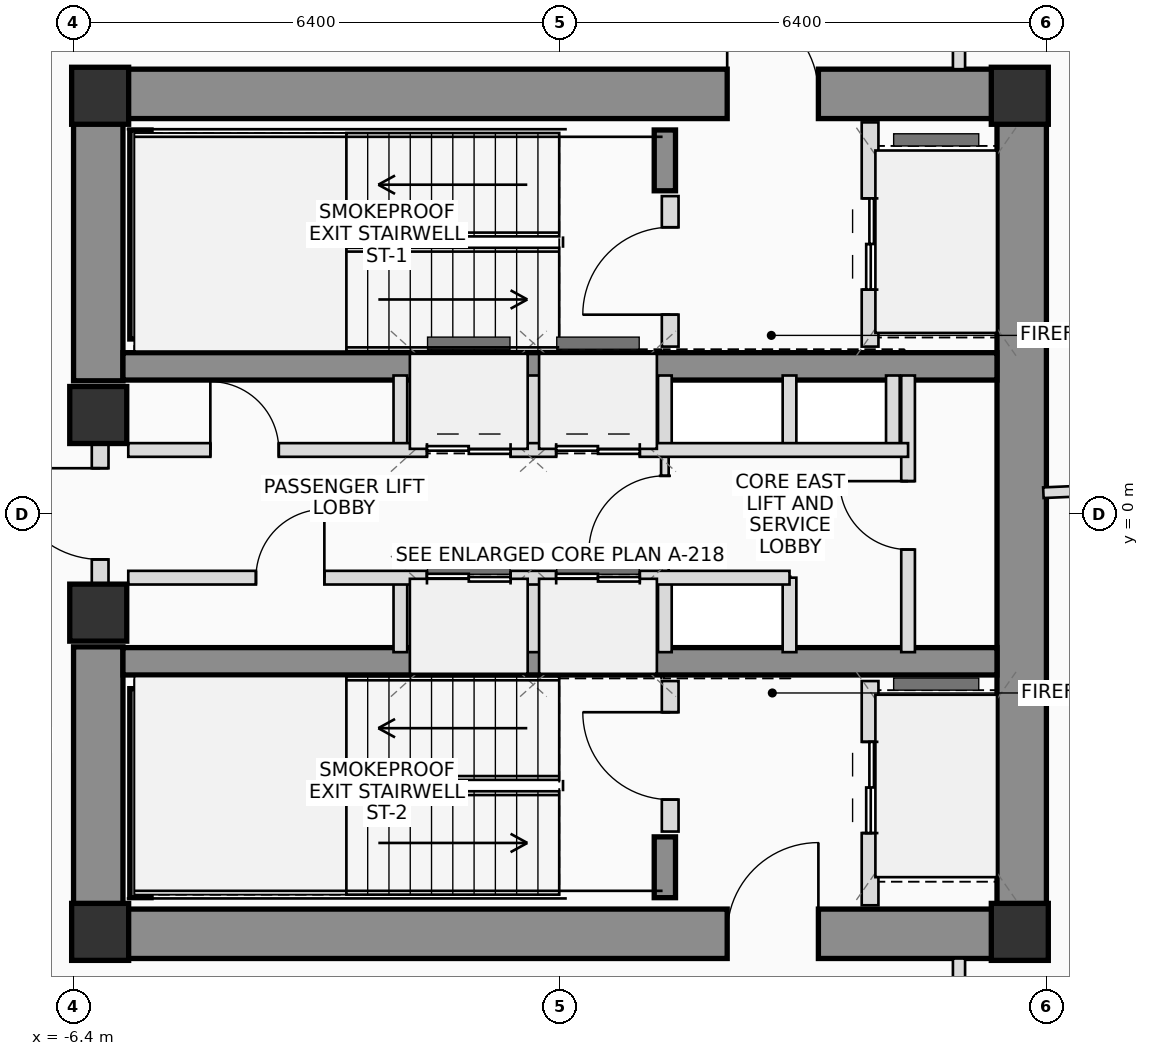
"""IFC4 building model, lengths in metres.
Left out: names, types, materials, properties, quantities, classifications, styles, units other than length and angle.
Written with IfcOpenShell. Run it as: python <this file> out.ifc"""

import sys

from ifc_helpers import new_model, si_unit, direction, frame, frame_2d, origin, origin_2d, place, context, subcontext, project, spatial, rectangle, extrude, source, transform, mapped, element, fill, save


model = new_model("IFC4")
c1 = context("Model", 3, precision=1e-05, world=origin(), true_north=direction((0.0, 1.0)))
c2 = subcontext(c1, "Body", "Model", "MODEL_VIEW")
j1 = project(units=[si_unit("LENGTHUNIT", "METRE"), si_unit("PLANEANGLEUNIT", "RADIAN")], contexts=[c1])
p1 = place(None, origin())
s1 = spatial("IfcSite", under=j1, at=p1, CompositionType="ELEMENT")
p2 = place(p1, origin())
s2 = spatial("IfcBuilding", under=s1, at=p2, CompositionType="ELEMENT")
p3 = place(p2, frame((0.0, 0.0, 201.8)))
s3 = spatial("IfcBuildingStorey", under=s2, at=p3, CompositionType="ELEMENT", Elevation=201.8)
m1 = source(origin(), c2, "Body", "SweptSolid", [
    extrude(rectangle(XDim=0.75, YDim=0.75, at=origin_2d()), origin(), (0.0, 0.0, 1.0), 3.45),
])
for number, where, z_axis, x_axis in (
    (1, (-6.05, -5.5, 0.0), (0.0, 0.0, 1.0), (1.0, 0.0, 0.0)),
    (2, (6.05, -5.5, 0.0), (0.0, 0.0, 1.0), (1.0, 0.0, 0.0)),
    (3, (6.05, 5.5, 0.0), (0.0, 0.0, 1.0), (1.0, 0.0, 0.0)),
    (4, (-6.05, 5.5, 0.0), (0.0, 0.0, 1.0), (1.0, 0.0, 0.0)),
):
    element("IfcColumn", number, at=place(p3, frame(where, z_axis=z_axis, x_axis=x_axis)), inside=s3, PredefinedType="COLUMN", context=c2, shape_type="MappedRepresentation", body=[
        mapped(m1, transform((0.0, 0.0, 0.0), scale=1.0)),
    ])
p4 = place(p3, frame((-6.4, 5.525, 0.0), z_axis=(0.0, 0.0, 1.0), x_axis=(1.0, 0.0, 0.0)))
e5 = element("IfcWall", 5, at=p4, inside=s3, PredefinedType="SHEAR", context=c2, shape_type="SweptSolid", body=[
    extrude(rectangle(XDim=12.8, YDim=0.65, at=frame_2d((6.4, 0.0))), origin(), (0.0, 0.0, 1.0), 3.45),
])
p5 = place(p4, frame((8.6, 0.0, 0.0)))
e6 = element("IfcOpeningElement", 6, at=p5, cuts=e5, PredefinedType="OPENING", context=c2, shape_type="SweptSolid", body=[
    extrude(rectangle(XDim=1.2, YDim=2.2, at=frame_2d((0.6, 1.1))), frame((0.0, 0.335, 0.0), z_axis=(0.0, -1.0, 0.0), x_axis=(1.0, 0.0, 0.0)), (0.0, 0.0, 1.0), 0.67),
])
p6 = place(p3, frame((-6.4, -5.525, 0.0), z_axis=(0.0, 0.0, 1.0), x_axis=(1.0, 0.0, 0.0)))
e7 = element("IfcWall", 7, at=p6, inside=s3, PredefinedType="SHEAR", context=c2, shape_type="SweptSolid", body=[
    extrude(rectangle(XDim=12.8, YDim=0.65, at=frame_2d((6.4, 0.0))), origin(), (0.0, 0.0, 1.0), 3.45),
])
p7 = place(p6, frame((8.6, 0.0, 0.0)))
e8 = element("IfcOpeningElement", 8, at=p7, cuts=e7, PredefinedType="OPENING", context=c2, shape_type="SweptSolid", body=[
    extrude(rectangle(XDim=1.2, YDim=2.2, at=frame_2d((0.6, 1.1))), frame((0.0, 0.335, 0.0), z_axis=(0.0, -1.0, 0.0), x_axis=(1.0, 0.0, 0.0)), (0.0, 0.0, 1.0), 0.67),
])
p8 = place(p3, frame((6.075, -5.2, 0.0), z_axis=(0.0, 0.0, 1.0), x_axis=(0.0, 1.0, 0.0)))
e9 = element("IfcWall", 9, at=p8, inside=s3, PredefinedType="SHEAR", context=c2, shape_type="SweptSolid", body=[
    extrude(rectangle(XDim=10.4, YDim=0.65, at=frame_2d((5.2, 0.0))), origin(), (0.0, 0.0, 1.0), 3.45),
])
for number, where, z_axis, x_axis in (
    (10, (-6.075, -5.2, 0.0), (0.0, 0.0, 1.0), (0.0, 1.0, 0.0)),
    (11, (-6.075, 1.75, 0.0), (0.0, 0.0, 1.0), (0.0, 1.0, 0.0)),
):
    element("IfcWall", number, at=place(p3, frame(where, z_axis=z_axis, x_axis=x_axis)), inside=s3, PredefinedType="SHEAR", context=c2, shape_type="SweptSolid", body=[
        extrude(rectangle(XDim=3.45, YDim=0.65, at=frame_2d((1.725, 0.0))), origin(), (0.0, 0.0, 1.0), 3.45),
    ])
for number, where, z_axis, x_axis in (
    (12, (-5.75, 1.94, 0.0), (0.0, 0.0, 1.0), (1.0, 0.0, 0.0)),
    (13, (-5.75, -1.94, 0.0), (0.0, 0.0, 1.0), (1.0, 0.0, 0.0)),
):
    element("IfcWall", number, at=place(p3, frame(where, z_axis=z_axis, x_axis=x_axis)), inside=s3, PredefinedType="SHEAR", context=c2, shape_type="SweptSolid", body=[
        extrude(rectangle(XDim=11.5, YDim=0.36, at=frame_2d((5.75, 0.0))), origin(), (0.0, 0.0, 1.0), 3.45),
    ])
p9 = place(p3, frame((-5.52, 2.3, 0.0), z_axis=(0.0, 0.0, 1.0), x_axis=(0.0, 1.0, 0.0)))
e14 = element("IfcWall", 14, at=p9, inside=s3, PredefinedType="SHEAR", context=c2, shape_type="SweptSolid", body=[
    extrude(rectangle(XDim=2.75, YDim=0.28, at=frame_2d((1.375, 0.0))), origin(), (0.0, 0.0, 1.0), 3.45),
])
p10 = place(p3, frame((1.38, 4.25, 0.0), z_axis=(0.0, 0.0, 1.0), x_axis=(0.0, 1.0, 0.0)))
e15 = element("IfcWall", 15, at=p10, inside=s3, PredefinedType="SHEAR", context=c2, shape_type="SweptSolid", body=[
    extrude(rectangle(XDim=0.8, YDim=0.28, at=frame_2d((0.4, 0.0))), origin(), (0.0, 0.0, 1.0), 3.45),
])
p11 = place(p3, frame((-5.52, -5.05, 0.0), z_axis=(0.0, 0.0, 1.0), x_axis=(0.0, 1.0, 0.0)))
e16 = element("IfcWall", 16, at=p11, inside=s3, PredefinedType="SHEAR", context=c2, shape_type="SweptSolid", body=[
    extrude(rectangle(XDim=2.75, YDim=0.28, at=frame_2d((1.375, 0.0))), origin(), (0.0, 0.0, 1.0), 3.45),
])
p12 = place(p3, frame((1.38, -5.05, 0.0), z_axis=(0.0, 0.0, 1.0), x_axis=(0.0, 1.0, 0.0)))
e17 = element("IfcWall", 17, at=p12, inside=s3, PredefinedType="SHEAR", context=c2, shape_type="SweptSolid", body=[
    extrude(rectangle(XDim=0.8, YDim=0.28, at=frame_2d((0.4, 0.0))), origin(), (0.0, 0.0, 1.0), 3.45),
])
for number, where, z_axis, x_axis in (
    (18, (-6.075, -1.3, 0.0), (0.0, 0.0, 1.0), (1.0, 0.0, 0.0)),
    (19, (-6.075, 1.3, 0.0), (0.0, 0.0, 1.0), (1.0, 0.0, 0.0)),
):
    element("IfcColumn", number, at=place(p3, frame(where, z_axis=z_axis, x_axis=x_axis)), inside=s3, PredefinedType="COLUMN", context=c2, shape_type="MappedRepresentation", body=[
        mapped(m1, transform((0.0, 0.0, 0.0), scale=1.0)),
    ])
p13 = place(p3, frame((-6.05, -0.95, 0.0), z_axis=(0.0, 0.0, 1.0), x_axis=(0.0, 1.0, 0.0)))
e20 = element("IfcWall", 20, at=p13, inside=s3, PredefinedType="PLUMBINGWALL", context=c2, shape_type="SweptSolid", body=[
    extrude(rectangle(XDim=1.9, YDim=0.22, at=frame_2d((0.95, 0.0))), origin(), (0.0, 0.0, 1.0), 2.23),
])
p14 = place(p13, frame((0.35, 0.0, 0.0)))
e21 = element("IfcOpeningElement", 21, at=p14, cuts=e20, PredefinedType="OPENING", context=c2, shape_type="SweptSolid", body=[
    extrude(rectangle(XDim=1.2, YDim=2.2, at=frame_2d((0.6, 1.1))), frame((0.0, 0.12, 0.0), z_axis=(0.0, -1.0, 0.0), x_axis=(1.0, 0.0, 0.0)), (0.0, 0.0, 1.0), 0.24),
])
p15 = place(p3, frame((1.45, 2.2, 0.0), z_axis=(0.0, 0.0, 1.0), x_axis=(0.0, 1.0, 0.0)))
e22 = element("IfcWall", 22, at=p15, inside=s3, PredefinedType="PLUMBINGWALL", context=c2, shape_type="SweptSolid", body=[
    extrude(rectangle(XDim=1.98, YDim=0.22, at=frame_2d((0.99, 0.0))), origin(), (0.0, 0.0, 1.0), 3.25),
])
p16 = place(p15, frame((0.42, 0.0, 0.0)))
e23 = element("IfcOpeningElement", 23, at=p16, cuts=e22, PredefinedType="OPENING", context=c2, shape_type="SweptSolid", body=[
    extrude(rectangle(XDim=1.15, YDim=2.15, at=frame_2d((0.575, 1.075))), frame((0.0, 0.12, 0.0), z_axis=(0.0, -1.0, 0.0), x_axis=(1.0, 0.0, 0.0)), (0.0, 0.0, 1.0), 0.24),
])
p17 = place(p3, frame((4.08, 2.2, 0.0), z_axis=(0.0, 0.0, 1.0), x_axis=(0.0, 1.0, 0.0)))
e24 = element("IfcWall", 24, at=p17, inside=s3, PredefinedType="PLUMBINGWALL", context=c2, shape_type="SweptSolid", body=[
    extrude(rectangle(XDim=2.95, YDim=0.22, at=frame_2d((1.475, 0.0))), origin(), (0.0, 0.0, 1.0), 3.25),
])
p18 = place(p17, frame((0.75, 0.0, 0.0)))
e25 = element("IfcOpeningElement", 25, at=p18, cuts=e24, PredefinedType="OPENING", context=c2, shape_type="SweptSolid", body=[
    extrude(rectangle(XDim=1.2, YDim=2.25, at=frame_2d((0.6, 1.125))), frame((0.0, 0.12, 0.0), z_axis=(0.0, -1.0, 0.0), x_axis=(1.0, 0.0, 0.0)), (0.0, 0.0, 1.0), 0.24),
])
p19 = place(p3, frame((1.45, -4.18, 0.0), z_axis=(0.0, 0.0, 1.0), x_axis=(0.0, 1.0, 0.0)))
e26 = element("IfcWall", 26, at=p19, inside=s3, PredefinedType="PLUMBINGWALL", context=c2, shape_type="SweptSolid", body=[
    extrude(rectangle(XDim=1.98, YDim=0.22, at=frame_2d((0.99, 0.0))), origin(), (0.0, 0.0, 1.0), 3.25),
])
p20 = place(p19, frame((0.42, 0.0, 0.0)))
e27 = element("IfcOpeningElement", 27, at=p20, cuts=e26, PredefinedType="OPENING", context=c2, shape_type="SweptSolid", body=[
    extrude(rectangle(XDim=1.15, YDim=2.15, at=frame_2d((0.575, 1.075))), frame((0.0, 0.12, 0.0), z_axis=(0.0, -1.0, 0.0), x_axis=(1.0, 0.0, 0.0)), (0.0, 0.0, 1.0), 0.24),
])
p21 = place(p3, frame((4.08, -5.15, 0.0), z_axis=(0.0, 0.0, 1.0), x_axis=(0.0, 1.0, 0.0)))
e28 = element("IfcWall", 28, at=p21, inside=s3, PredefinedType="PLUMBINGWALL", context=c2, shape_type="SweptSolid", body=[
    extrude(rectangle(XDim=2.95, YDim=0.22, at=frame_2d((1.475, 0.0))), origin(), (0.0, 0.0, 1.0), 3.25),
])
p22 = place(p21, frame((0.95, 0.0, 0.0)))
e29 = element("IfcOpeningElement", 29, at=p22, cuts=e28, PredefinedType="OPENING", context=c2, shape_type="SweptSolid", body=[
    extrude(rectangle(XDim=1.2, YDim=2.25, at=frame_2d((0.6, 1.125))), frame((0.0, 0.12, 0.0), z_axis=(0.0, -1.0, 0.0), x_axis=(1.0, 0.0, 0.0)), (0.0, 0.0, 1.0), 0.24),
])
p23 = place(p3, frame((1.38, -0.84, 0.0), z_axis=(0.0, 0.0, 1.0), x_axis=(0.0, 1.0, 0.0)))
e30 = element("IfcWall", 30, at=p23, inside=s3, PredefinedType="PARTITIONING", context=c2, shape_type="SweptSolid", body=[
    extrude(rectangle(XDim=1.68, YDim=0.1, at=frame_2d((0.84, 0.0))), origin(), (0.0, 0.0, 1.0), 3.25),
])
p24 = place(p23, frame((0.34, 0.0, 0.0)))
e31 = element("IfcOpeningElement", 31, at=p24, cuts=e30, PredefinedType="OPENING", context=c2, shape_type="SweptSolid", body=[
    extrude(rectangle(XDim=1.0, YDim=2.25, at=frame_2d((0.5, 1.125))), frame((0.0, 0.06, 0.0), z_axis=(0.0, -1.0, 0.0), x_axis=(1.0, 0.0, 0.0)), (0.0, 0.0, 1.0), 0.12),
])
for number, where, z_axis, x_axis in (
    (32, (-2.1, 0.84, 0.0), (0.0, 0.0, 1.0), (0.0, 1.0, 0.0)),
    (33, (-2.1, -1.82, 0.0), (0.0, 0.0, 1.0), (0.0, 1.0, 0.0)),
    (34, (-0.35, 0.84, 0.0), (0.0, 0.0, 1.0), (0.0, 1.0, 0.0)),
    (35, (-0.35, -1.82, 0.0), (0.0, 0.0, 1.0), (0.0, 1.0, 0.0)),
    (36, (1.38, 0.84, 0.0), (0.0, 0.0, 1.0), (0.0, 1.0, 0.0)),
    (37, (1.38, -1.82, 0.0), (0.0, 0.0, 1.0), (0.0, 1.0, 0.0)),
    (38, (3.02, 0.84, 0.0), (0.0, 0.0, 1.0), (0.0, 1.0, 0.0)),
    (39, (4.38, 0.84, 0.0), (0.0, 0.0, 1.0), (0.0, 1.0, 0.0)),
    (40, (3.02, -1.82, 0.0), (0.0, 0.0, 1.0), (0.0, 1.0, 0.0)),
):
    element("IfcWall", number, at=place(p3, frame(where, z_axis=z_axis, x_axis=x_axis)), inside=s3, PredefinedType="PLUMBINGWALL", context=c2, shape_type="SweptSolid", body=[
        extrude(rectangle(XDim=0.98, YDim=0.18, at=frame_2d((0.49, 0.0))), origin(), (0.0, 0.0, 1.0), 3.25),
    ])
p25 = place(p3, frame((4.58, -1.82, 0.0), z_axis=(0.0, 0.0, 1.0), x_axis=(0.0, 1.0, 0.0)))
e41 = element("IfcWall", 41, at=p25, inside=s3, PredefinedType="PLUMBINGWALL", context=c2, shape_type="SweptSolid", body=[
    extrude(rectangle(XDim=3.64, YDim=0.18, at=frame_2d((1.82, 0.0))), origin(), (0.0, 0.0, 1.0), 3.25),
])
p26 = place(p25, frame((1.35, 0.0, 0.0)))
e42 = element("IfcOpeningElement", 42, at=p26, cuts=e41, PredefinedType="OPENING", context=c2, shape_type="SweptSolid", body=[
    extrude(rectangle(XDim=0.9, YDim=2.05, at=frame_2d((0.45, 1.025))), frame((0.0, 0.1, 0.0), z_axis=(0.0, -1.0, 0.0), x_axis=(1.0, 0.0, 0.0)), (0.0, 0.0, 1.0), 0.2),
])
p27 = place(p3, frame((-5.68, 0.84, 0.0), z_axis=(0.0, 0.0, 1.0), x_axis=(1.0, 0.0, 0.0)))
e43 = element("IfcWall", 43, at=p27, inside=s3, PredefinedType="PLUMBINGWALL", context=c2, shape_type="SweptSolid", body=[
    extrude(rectangle(XDim=10.26, YDim=0.18, at=frame_2d((5.13, 0.0))), origin(), (0.0, 0.0, 1.0), 3.25),
])
p28 = place(p27, frame((1.08, 0.0, 0.0)))
e44 = element("IfcOpeningElement", 44, at=p28, cuts=e43, PredefinedType="OPENING", context=c2, shape_type="SweptSolid", body=[
    extrude(rectangle(XDim=0.9, YDim=2.05, at=frame_2d((0.45, 1.025))), frame((0.0, 0.1, 0.0), z_axis=(0.0, -1.0, 0.0), x_axis=(1.0, 0.0, 0.0)), (0.0, 0.0, 1.0), 0.2),
])
p29 = place(p27, frame((3.93, 0.0, 0.0)))
e45 = element("IfcOpeningElement", 45, at=p29, cuts=e43, PredefinedType="OPENING", context=c2, shape_type="SweptSolid", body=[
    extrude(rectangle(XDim=1.1, YDim=2.2, at=frame_2d((0.55, 1.1))), frame((0.0, 0.1, 0.0), z_axis=(0.0, -1.0, 0.0), x_axis=(1.0, 0.0, 0.0)), (0.0, 0.0, 1.0), 0.2),
])
p30 = place(p27, frame((5.63, 0.0, 0.0)))
e46 = element("IfcOpeningElement", 46, at=p30, cuts=e43, PredefinedType="OPENING", context=c2, shape_type="SweptSolid", body=[
    extrude(rectangle(XDim=1.1, YDim=2.2, at=frame_2d((0.55, 1.1))), frame((0.0, 0.1, 0.0), z_axis=(0.0, -1.0, 0.0), x_axis=(1.0, 0.0, 0.0)), (0.0, 0.0, 1.0), 0.2),
])
p31 = place(p3, frame((-5.68, -0.84, 0.0), z_axis=(0.0, 0.0, 1.0), x_axis=(1.0, 0.0, 0.0)))
e47 = element("IfcWall", 47, at=p31, inside=s3, PredefinedType="PLUMBINGWALL", context=c2, shape_type="SweptSolid", body=[
    extrude(rectangle(XDim=8.7, YDim=0.18, at=frame_2d((4.35, 0.0))), origin(), (0.0, 0.0, 1.0), 3.25),
])
p32 = place(p31, frame((1.68, 0.0, 0.0)))
e48 = element("IfcOpeningElement", 48, at=p32, cuts=e47, PredefinedType="OPENING", context=c2, shape_type="SweptSolid", body=[
    extrude(rectangle(XDim=0.9, YDim=2.05, at=frame_2d((0.45, 1.025))), frame((0.0, 0.1, 0.0), z_axis=(0.0, -1.0, 0.0), x_axis=(1.0, 0.0, 0.0)), (0.0, 0.0, 1.0), 0.2),
])
p33 = place(p31, frame((3.93, 0.0, 0.0)))
e49 = element("IfcOpeningElement", 49, at=p33, cuts=e47, PredefinedType="OPENING", context=c2, shape_type="SweptSolid", body=[
    extrude(rectangle(XDim=1.1, YDim=2.2, at=frame_2d((0.55, 1.1))), frame((0.0, 0.1, 0.0), z_axis=(0.0, -1.0, 0.0), x_axis=(1.0, 0.0, 0.0)), (0.0, 0.0, 1.0), 0.2),
])
p34 = place(p31, frame((5.63, 0.0, 0.0)))
e50 = element("IfcOpeningElement", 50, at=p34, cuts=e47, PredefinedType="OPENING", context=c2, shape_type="SweptSolid", body=[
    extrude(rectangle(XDim=1.1, YDim=2.2, at=frame_2d((0.55, 1.1))), frame((0.0, 0.1, 0.0), z_axis=(0.0, -1.0, 0.0), x_axis=(1.0, 0.0, 0.0)), (0.0, 0.0, 1.0), 0.2),
])
p35 = place(p3, frame((5.25, 7.55, 0.0), z_axis=(0.0, 0.0, 1.0), x_axis=(0.0, -1.0, 0.0)))
e51 = element("IfcWall", 51, at=p35, inside=s3, PredefinedType="PARTITIONING", context=c2, shape_type="SweptSolid", body=[
    extrude(rectangle(XDim=1.7, YDim=0.16, at=frame_2d((0.85, 0.0))), origin(), (0.0, 0.0, 1.0), 2.605),
])
p36 = place(p3, frame((5.25, -5.85, 0.0), z_axis=(0.0, 0.0, 1.0), x_axis=(0.0, -1.0, 0.0)))
e52 = element("IfcWall", 52, at=p36, inside=s3, PredefinedType="PARTITIONING", context=c2, shape_type="SweptSolid", body=[
    extrude(rectangle(XDim=1.7, YDim=0.16, at=frame_2d((0.85, 0.0))), origin(), (0.0, 0.0, 1.0), 3.25),
])
p37 = place(p3, frame((6.36, 0.278, 0.0), z_axis=(0.0, 0.0, 1.0), x_axis=(0.999047440648, 0.043637270025, 0.0)))
e53 = element("IfcWall", 53, at=p37, inside=s3, PredefinedType="PARTITIONING", context=c2, shape_type="SweptSolid", body=[
    extrude(rectangle(XDim=8.633, YDim=0.14, at=frame_2d((4.316, 0.0))), origin(), (0.0, 0.0, 1.0), 2.605),
])
p38 = place(p5, origin())
e54 = element("IfcDoor", 54, at=p38, inside=s3, OperationType="SINGLE_SWING_LEFT", PredefinedType="DOOR", context=c2, shape_type="SweptSolid", body=[
    extrude(rectangle(XDim=1.2, YDim=2.2, at=frame_2d((0.6, 1.1))), frame((0.0, 0.025, 0.0), z_axis=(0.0, -1.0, 0.0), x_axis=(1.0, 0.0, 0.0)), (0.0, 0.0, 1.0), 0.05),
])
fill(e6, e54)
p39 = place(p7, origin())
e55 = element("IfcDoor", 55, at=p39, inside=s3, OperationType="SINGLE_SWING_RIGHT", PredefinedType="DOOR", context=c2, shape_type="SweptSolid", body=[
    extrude(rectangle(XDim=1.2, YDim=2.2, at=frame_2d((0.6, 1.1))), frame((0.0, 0.025, 0.0), z_axis=(0.0, -1.0, 0.0), x_axis=(1.0, 0.0, 0.0)), (0.0, 0.0, 1.0), 0.05),
])
fill(e8, e55)
p40 = place(p14, origin())
e56 = element("IfcDoor", 56, at=p40, inside=s3, OperationType="SINGLE_SWING_RIGHT", PredefinedType="DOOR", context=c2, shape_type="SweptSolid", body=[
    extrude(rectangle(XDim=1.2, YDim=2.2, at=frame_2d((0.6, 1.1))), frame((0.0, 0.025, 0.0), z_axis=(0.0, -1.0, 0.0), x_axis=(1.0, 0.0, 0.0)), (0.0, 0.0, 1.0), 0.05),
])
fill(e21, e56)
p41 = place(p16, origin())
e57 = element("IfcDoor", 57, at=p41, inside=s3, OperationType="SINGLE_SWING_LEFT", PredefinedType="DOOR", context=c2, shape_type="SweptSolid", body=[
    extrude(rectangle(XDim=1.15, YDim=2.15, at=frame_2d((0.575, 1.075))), frame((0.0, 0.025, 0.0), z_axis=(0.0, -1.0, 0.0), x_axis=(1.0, 0.0, 0.0)), (0.0, 0.0, 1.0), 0.05),
])
fill(e23, e57)
p42 = place(p18, origin())
e58 = element("IfcDoor", 58, at=p42, inside=s3, OperationType="DOUBLE_DOOR_SLIDING", PredefinedType="DOOR", context=c2, shape_type="SweptSolid", body=[
    extrude(rectangle(XDim=1.2, YDim=2.25, at=frame_2d((0.6, 1.125))), frame((0.0, 0.025, 0.0), z_axis=(0.0, -1.0, 0.0), x_axis=(1.0, 0.0, 0.0)), (0.0, 0.0, 1.0), 0.05),
])
fill(e25, e58)
p43 = place(p20, origin())
e59 = element("IfcDoor", 59, at=p43, inside=s3, OperationType="SINGLE_SWING_RIGHT", PredefinedType="DOOR", context=c2, shape_type="SweptSolid", body=[
    extrude(rectangle(XDim=1.15, YDim=2.15, at=frame_2d((0.575, 1.075))), frame((0.0, 0.025, 0.0), z_axis=(0.0, -1.0, 0.0), x_axis=(1.0, 0.0, 0.0)), (0.0, 0.0, 1.0), 0.05),
])
fill(e27, e59)
p44 = place(p22, origin())
e60 = element("IfcDoor", 60, at=p44, inside=s3, OperationType="DOUBLE_DOOR_SLIDING", PredefinedType="DOOR", context=c2, shape_type="SweptSolid", body=[
    extrude(rectangle(XDim=1.2, YDim=2.25, at=frame_2d((0.6, 1.125))), frame((0.0, 0.025, 0.0), z_axis=(0.0, -1.0, 0.0), x_axis=(1.0, 0.0, 0.0)), (0.0, 0.0, 1.0), 0.05),
])
fill(e29, e60)
p45 = place(p24, origin())
e61 = element("IfcDoor", 61, at=p45, inside=s3, OperationType="SINGLE_SWING_LEFT", PredefinedType="DOOR", context=c2, shape_type="SweptSolid", body=[
    extrude(rectangle(XDim=1.0, YDim=2.25, at=frame_2d((0.5, 1.125))), frame((0.0, 0.025, 0.0), z_axis=(0.0, -1.0, 0.0), x_axis=(1.0, 0.0, 0.0)), (0.0, 0.0, 1.0), 0.05),
])
fill(e31, e61)
p46 = place(p26, origin())
e62 = element("IfcDoor", 62, at=p46, inside=s3, OperationType="SINGLE_SWING_RIGHT", PredefinedType="DOOR", context=c2, shape_type="SweptSolid", body=[
    extrude(rectangle(XDim=0.9, YDim=2.05, at=frame_2d((0.45, 1.025))), frame((0.0, 0.025, 0.0), z_axis=(0.0, -1.0, 0.0), x_axis=(1.0, 0.0, 0.0)), (0.0, 0.0, 1.0), 0.05),
])
fill(e42, e62)
p47 = place(p28, origin())
e63 = element("IfcDoor", 63, at=p47, inside=s3, OperationType="SINGLE_SWING_LEFT", PredefinedType="DOOR", context=c2, shape_type="SweptSolid", body=[
    extrude(rectangle(XDim=0.9, YDim=2.05, at=frame_2d((0.45, 1.025))), frame((0.0, 0.025, 0.0), z_axis=(0.0, -1.0, 0.0), x_axis=(1.0, 0.0, 0.0)), (0.0, 0.0, 1.0), 0.05),
])
fill(e44, e63)
p48 = place(p29, origin())
e64 = element("IfcDoor", 64, at=p48, inside=s3, OperationType="DOUBLE_DOOR_SLIDING", PredefinedType="DOOR", context=c2, shape_type="SweptSolid", body=[
    extrude(rectangle(XDim=1.1, YDim=2.2, at=frame_2d((0.55, 1.1))), frame((0.0, 0.025, 0.0), z_axis=(0.0, -1.0, 0.0), x_axis=(1.0, 0.0, 0.0)), (0.0, 0.0, 1.0), 0.05),
])
fill(e45, e64)
p49 = place(p30, origin())
e65 = element("IfcDoor", 65, at=p49, inside=s3, OperationType="DOUBLE_DOOR_SLIDING", PredefinedType="DOOR", context=c2, shape_type="SweptSolid", body=[
    extrude(rectangle(XDim=1.1, YDim=2.2, at=frame_2d((0.55, 1.1))), frame((0.0, 0.025, 0.0), z_axis=(0.0, -1.0, 0.0), x_axis=(1.0, 0.0, 0.0)), (0.0, 0.0, 1.0), 0.05),
])
fill(e46, e65)
p50 = place(p32, origin())
e66 = element("IfcDoor", 66, at=p50, inside=s3, OperationType="SINGLE_SWING_RIGHT", PredefinedType="DOOR", context=c2, shape_type="SweptSolid", body=[
    extrude(rectangle(XDim=0.9, YDim=2.05, at=frame_2d((0.45, 1.025))), frame((0.0, 0.025, 0.0), z_axis=(0.0, -1.0, 0.0), x_axis=(1.0, 0.0, 0.0)), (0.0, 0.0, 1.0), 0.05),
])
fill(e48, e66)
p51 = place(p33, origin())
e67 = element("IfcDoor", 67, at=p51, inside=s3, OperationType="DOUBLE_DOOR_SLIDING", PredefinedType="DOOR", context=c2, shape_type="SweptSolid", body=[
    extrude(rectangle(XDim=1.1, YDim=2.2, at=frame_2d((0.55, 1.1))), frame((0.0, 0.025, 0.0), z_axis=(0.0, -1.0, 0.0), x_axis=(1.0, 0.0, 0.0)), (0.0, 0.0, 1.0), 0.05),
])
fill(e49, e67)
p52 = place(p34, origin())
e68 = element("IfcDoor", 68, at=p52, inside=s3, OperationType="DOUBLE_DOOR_SLIDING", PredefinedType="DOOR", context=c2, shape_type="SweptSolid", body=[
    extrude(rectangle(XDim=1.1, YDim=2.2, at=frame_2d((0.55, 1.1))), frame((0.0, 0.025, 0.0), z_axis=(0.0, -1.0, 0.0), x_axis=(1.0, 0.0, 0.0)), (0.0, 0.0, 1.0), 0.05),
])
fill(e50, e68)
save(model, sys.argv[1])
